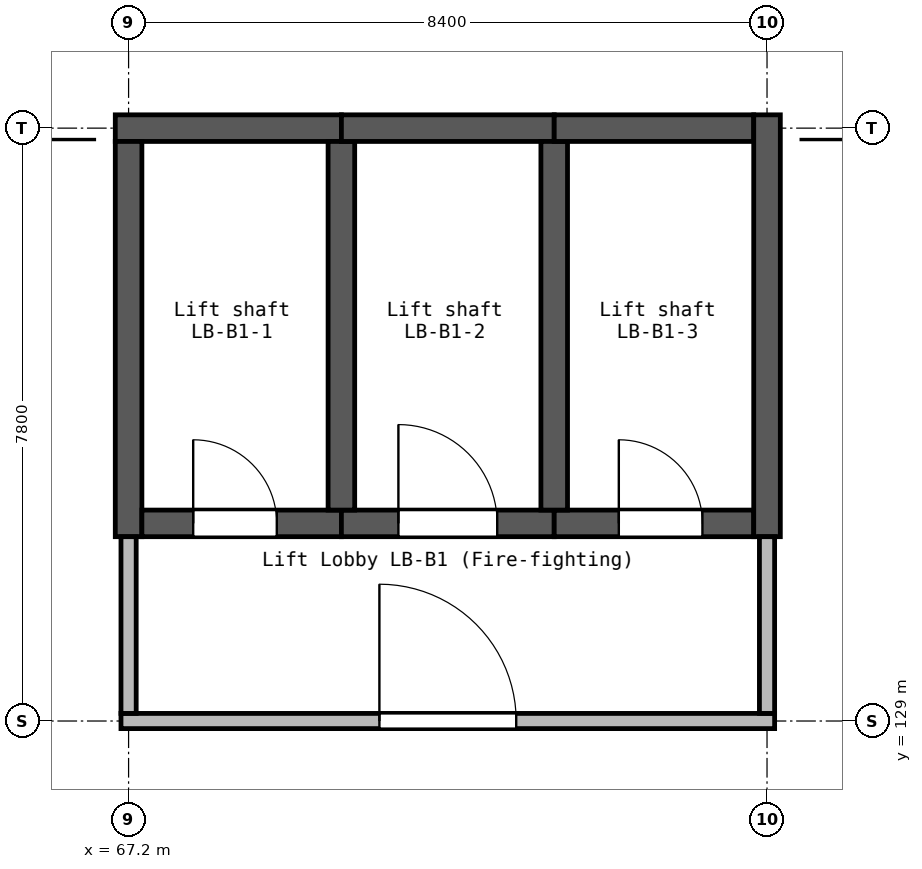
"""IFC4 building model, lengths in metres.
Left out: names, types, materials, properties, quantities, classifications, styles, units other than length and angle.
Written with IfcOpenShell. Run it as: python <this file> out.ifc"""

import sys

from ifc_helpers import new_model, si_unit, direction, frame, frame_2d, origin, place, context, subcontext, project, spatial, rectangle, extrude, element, fill, save


model = new_model("IFC4")
c1 = context("Model", 3, precision=1e-05, world=origin(), true_north=direction((0.0, 1.0)))
c2 = subcontext(c1, "Body", "Model", "MODEL_VIEW")
j1 = project(units=[si_unit("LENGTHUNIT", "METRE"), si_unit("PLANEANGLEUNIT", "RADIAN")], contexts=[c1])
p1 = place(None, origin())
s1 = spatial("IfcSite", under=j1, at=p1, CompositionType="ELEMENT")
p2 = place(p1, origin())
s2 = spatial("IfcBuilding", under=s1, at=p2, CompositionType="ELEMENT")
p3 = place(p2, frame((0.0, 0.0, 28.8)))
s3 = spatial("IfcBuildingStorey", under=s2, at=p3, CompositionType="ELEMENT", Elevation=28.8)
p4 = place(p3, frame((67.025, 136.8, 0.0), z_axis=(0.0, 0.0, 1.0), x_axis=(1.0, 0.0, 0.0)))
e1 = element("IfcWall", 1, at=p4, inside=s3, PredefinedType="SHEAR", context=c2, shape_type="SweptSolid", body=[
    extrude(rectangle(XDim=2.975, YDim=0.35, at=frame_2d((1.488, 0.0))), origin(), (0.0, 0.0, 1.0), 3.7),
])
p5 = place(p3, frame((67.2, 131.425, 0.0), z_axis=(0.0, 0.0, 1.0), x_axis=(0.0, 1.0, 0.0)))
e2 = element("IfcWall", 2, at=p5, inside=s3, PredefinedType="SHEAR", context=c2, shape_type="SweptSolid", body=[
    extrude(rectangle(XDim=5.2, YDim=0.35, at=frame_2d((2.6, 0.0))), origin(), (0.0, 0.0, 1.0), 3.7),
])
p6 = place(p3, frame((67.375, 131.6, 0.0), z_axis=(0.0, 0.0, 1.0), x_axis=(1.0, 0.0, 0.0)))
e3 = element("IfcWall", 3, at=p6, inside=s3, PredefinedType="SHEAR", context=c2, shape_type="SweptSolid", body=[
    extrude(rectangle(XDim=2.625, YDim=0.35, at=frame_2d((1.312, 0.0))), origin(), (0.0, 0.0, 1.0), 3.7),
])
p7 = place(p6, frame((0.675, 0.0, 0.0)))
e4 = element("IfcOpeningElement", 4, at=p7, cuts=e3, PredefinedType="OPENING", context=c2, shape_type="SweptSolid", body=[
    extrude(rectangle(XDim=1.1, YDim=2.1, at=frame_2d((0.55, 1.05))), frame((0.0, 0.185, 0.0), z_axis=(0.0, -1.0, 0.0), x_axis=(1.0, 0.0, 0.0)), (0.0, 0.0, 1.0), 0.37),
])
p8 = place(p3, frame((70.0, 131.6, 0.0), z_axis=(0.0, 0.0, 1.0), x_axis=(1.0, 0.0, 0.0)))
e5 = element("IfcWall", 5, at=p8, inside=s3, PredefinedType="SHEAR", context=c2, shape_type="SweptSolid", body=[
    extrude(rectangle(XDim=2.8, YDim=0.35, at=frame_2d((1.4, 0.0))), origin(), (0.0, 0.0, 1.0), 3.7),
])
p9 = place(p8, frame((0.75, 0.0, 0.0)))
e6 = element("IfcOpeningElement", 6, at=p9, cuts=e5, PredefinedType="OPENING", context=c2, shape_type="SweptSolid", body=[
    extrude(rectangle(XDim=1.3, YDim=2.1, at=frame_2d((0.65, 1.05))), frame((0.0, 0.185, 0.0), z_axis=(0.0, -1.0, 0.0), x_axis=(1.0, 0.0, 0.0)), (0.0, 0.0, 1.0), 0.37),
])
p10 = place(p3, frame((70.0, 131.775, 0.0), z_axis=(0.0, 0.0, 1.0), x_axis=(0.0, 1.0, 0.0)))
e7 = element("IfcWall", 7, at=p10, inside=s3, PredefinedType="SHEAR", context=c2, shape_type="SweptSolid", body=[
    extrude(rectangle(XDim=4.85, YDim=0.35, at=frame_2d((2.425, 0.0))), origin(), (0.0, 0.0, 1.0), 3.7),
])
p11 = place(p3, frame((70.0, 136.8, 0.0), z_axis=(0.0, 0.0, 1.0), x_axis=(1.0, 0.0, 0.0)))
e8 = element("IfcWall", 8, at=p11, inside=s3, PredefinedType="SHEAR", context=c2, shape_type="SweptSolid", body=[
    extrude(rectangle(XDim=2.8, YDim=0.35, at=frame_2d((1.4, 0.0))), origin(), (0.0, 0.0, 1.0), 3.7),
])
p12 = place(p3, frame((72.8, 131.6, 0.0), z_axis=(0.0, 0.0, 1.0), x_axis=(1.0, 0.0, 0.0)))
e9 = element("IfcWall", 9, at=p12, inside=s3, PredefinedType="SHEAR", context=c2, shape_type="SweptSolid", body=[
    extrude(rectangle(XDim=2.625, YDim=0.35, at=frame_2d((1.312, 0.0))), origin(), (0.0, 0.0, 1.0), 3.7),
])
p13 = place(p12, frame((0.85, 0.0, 0.0)))
e10 = element("IfcOpeningElement", 10, at=p13, cuts=e9, PredefinedType="OPENING", context=c2, shape_type="SweptSolid", body=[
    extrude(rectangle(XDim=1.1, YDim=2.1, at=frame_2d((0.55, 1.05))), frame((0.0, 0.185, 0.0), z_axis=(0.0, -1.0, 0.0), x_axis=(1.0, 0.0, 0.0)), (0.0, 0.0, 1.0), 0.37),
])
p14 = place(p3, frame((72.8, 131.775, 0.0), z_axis=(0.0, 0.0, 1.0), x_axis=(0.0, 1.0, 0.0)))
e11 = element("IfcWall", 11, at=p14, inside=s3, PredefinedType="SHEAR", context=c2, shape_type="SweptSolid", body=[
    extrude(rectangle(XDim=4.85, YDim=0.35, at=frame_2d((2.425, 0.0))), origin(), (0.0, 0.0, 1.0), 3.7),
])
p15 = place(p3, frame((72.8, 136.8, 0.0), z_axis=(0.0, 0.0, 1.0), x_axis=(1.0, 0.0, 0.0)))
e12 = element("IfcWall", 12, at=p15, inside=s3, PredefinedType="SHEAR", context=c2, shape_type="SweptSolid", body=[
    extrude(rectangle(XDim=2.625, YDim=0.35, at=frame_2d((1.312, 0.0))), origin(), (0.0, 0.0, 1.0), 3.7),
])
p16 = place(p3, frame((75.6, 131.425, 0.0), z_axis=(0.0, 0.0, 1.0), x_axis=(0.0, 1.0, 0.0)))
e13 = element("IfcWall", 13, at=p16, inside=s3, PredefinedType="SHEAR", context=c2, shape_type="SweptSolid", body=[
    extrude(rectangle(XDim=5.55, YDim=0.35, at=frame_2d((2.775, 0.0))), origin(), (0.0, 0.0, 1.0), 3.7),
])
p17 = place(p3, frame((67.1, 129.0, 0.0), z_axis=(0.0, 0.0, 1.0), x_axis=(1.0, 0.0, 0.0)))
e14 = element("IfcWall", 14, at=p17, inside=s3, PredefinedType="SOLIDWALL", context=c2, shape_type="SweptSolid", body=[
    extrude(rectangle(XDim=8.6, YDim=0.2, at=frame_2d((4.3, 0.0))), origin(), (0.0, 0.0, 1.0), 3.6),
])
p18 = place(p17, frame((3.4, 0.0, 0.0)))
e15 = element("IfcOpeningElement", 15, at=p18, cuts=e14, PredefinedType="OPENING", context=c2, shape_type="SweptSolid", body=[
    extrude(rectangle(XDim=1.8, YDim=2.1, at=frame_2d((0.9, 1.05))), frame((0.0, 0.11, 0.0), z_axis=(0.0, -1.0, 0.0), x_axis=(1.0, 0.0, 0.0)), (0.0, 0.0, 1.0), 0.22),
])
for number, where, z_axis, x_axis in (
    (16, (67.2, 129.1, 0.0), (0.0, 0.0, 1.0), (0.0, 1.0, 0.0)),
    (17, (75.6, 129.1, 0.0), (0.0, 0.0, 1.0), (0.0, 1.0, 0.0)),
):
    element("IfcWall", number, at=place(p3, frame(where, z_axis=z_axis, x_axis=x_axis)), inside=s3, PredefinedType="SOLIDWALL", context=c2, shape_type="SweptSolid", body=[
        extrude(rectangle(XDim=2.325, YDim=0.2, at=frame_2d((1.163, 0.0))), origin(), (0.0, 0.0, 1.0), 3.6),
    ])
p19 = place(p18, origin())
e18 = element("IfcDoor", 18, at=p19, inside=s3, OperationType="DOUBLE_DOOR_SINGLE_SWING", PredefinedType="DOOR", context=c2, shape_type="SweptSolid", body=[
    extrude(rectangle(XDim=1.8, YDim=2.1, at=frame_2d((0.9, 1.05))), frame((0.0, 0.025, 0.0), z_axis=(0.0, -1.0, 0.0), x_axis=(1.0, 0.0, 0.0)), (0.0, 0.0, 1.0), 0.05),
])
fill(e15, e18)
p20 = place(p7, origin())
e19 = element("IfcDoor", 19, at=p20, inside=s3, OperationType="DOUBLE_DOOR_SLIDING", PredefinedType="DOOR", context=c2, shape_type="SweptSolid", body=[
    extrude(rectangle(XDim=1.1, YDim=2.1, at=frame_2d((0.55, 1.05))), frame((0.0, 0.025, 0.0), z_axis=(0.0, -1.0, 0.0), x_axis=(1.0, 0.0, 0.0)), (0.0, 0.0, 1.0), 0.05),
])
fill(e4, e19)
p21 = place(p9, origin())
e20 = element("IfcDoor", 20, at=p21, inside=s3, OperationType="DOUBLE_DOOR_SLIDING", PredefinedType="DOOR", context=c2, shape_type="SweptSolid", body=[
    extrude(rectangle(XDim=1.3, YDim=2.1, at=frame_2d((0.65, 1.05))), frame((0.0, 0.025, 0.0), z_axis=(0.0, -1.0, 0.0), x_axis=(1.0, 0.0, 0.0)), (0.0, 0.0, 1.0), 0.05),
])
fill(e6, e20)
p22 = place(p13, origin())
e21 = element("IfcDoor", 21, at=p22, inside=s3, OperationType="DOUBLE_DOOR_SLIDING", PredefinedType="DOOR", context=c2, shape_type="SweptSolid", body=[
    extrude(rectangle(XDim=1.1, YDim=2.1, at=frame_2d((0.55, 1.05))), frame((0.0, 0.025, 0.0), z_axis=(0.0, -1.0, 0.0), x_axis=(1.0, 0.0, 0.0)), (0.0, 0.0, 1.0), 0.05),
])
fill(e10, e21)
save(model, sys.argv[1])
